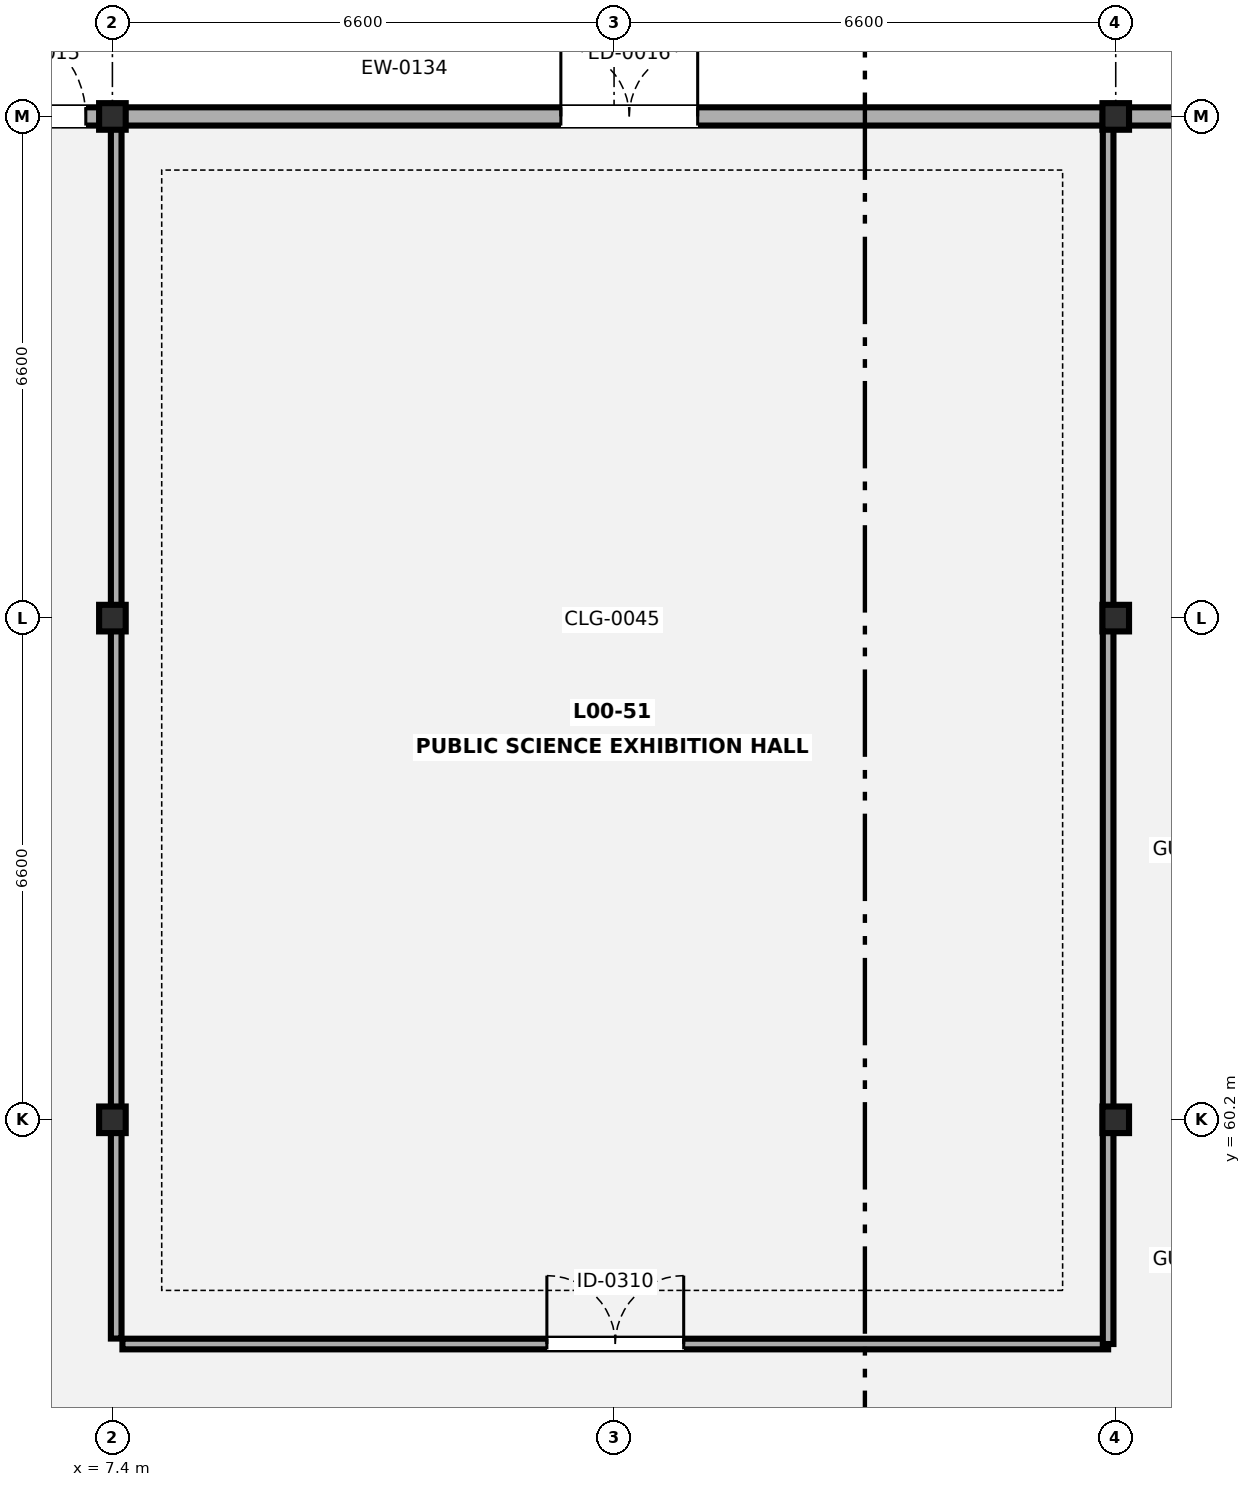
"""IFC4 building model, lengths in metres.
Left out: names, types, materials, properties, quantities, classifications, styles, units other than length and angle.
Written with IfcOpenShell. Run it as: python <this file> out.ifc"""

import sys

from ifc_helpers import new_model, si_unit, direction, frame, frame_2d, origin, origin_2d, place, context, subcontext, project, spatial, rectangle, i_section, extrude, element, fill, save


model = new_model("IFC4")
c1 = context("Model", 3, precision=1e-05, world=origin(), true_north=direction((0.0, 1.0)))
c2 = subcontext(c1, "Body", "Model", "MODEL_VIEW")
j1 = project(units=[si_unit("LENGTHUNIT", "METRE"), si_unit("PLANEANGLEUNIT", "RADIAN")], contexts=[c1])
p1 = place(None, origin())
s1 = spatial("IfcSite", under=j1, at=p1, CompositionType="ELEMENT")
p2 = place(p1, origin())
s2 = spatial("IfcBuilding", under=s1, at=p2, CompositionType="ELEMENT")
p3 = place(p2, origin())
s3 = spatial("IfcBuildingStorey", under=s2, at=p3, CompositionType="ELEMENT", Elevation=0.0)
for number, where, z_axis, x_axis in (
    (1, (7.4, 60.2, 0.0), (0.0, 0.0, 1.0), (1.0, 0.0, 0.0)),
    (2, (7.4, 66.8, 0.0), (0.0, 0.0, 1.0), (1.0, 0.0, 0.0)),
    (3, (7.4, 73.4, 0.0), (0.0, 0.0, 1.0), (1.0, 0.0, 0.0)),
    (4, (20.6, 60.2, 0.0), (0.0, 0.0, 1.0), (1.0, 0.0, 0.0)),
    (5, (20.6, 66.8, 0.0), (0.0, 0.0, 1.0), (1.0, 0.0, 0.0)),
    (6, (20.6, 73.4, 0.0), (0.0, 0.0, 1.0), (1.0, 0.0, 0.0)),
):
    element("IfcColumn", number, at=place(p3, frame(where, z_axis=z_axis, x_axis=x_axis)), inside=s3, PredefinedType="COLUMN", context=c2, shape_type="SweptSolid", body=[
        extrude(i_section(OverallWidth=0.35, OverallDepth=0.35, WebThickness=0.02, FlangeThickness=0.032, FilletRadius=0.016, at=origin_2d()), origin(), (0.0, 0.0, 1.0), 4.9),
    ])
p4 = place(p3, frame((1.973, 73.4, 0.0), z_axis=(0.0, 0.0, 1.0), x_axis=(1.0, 0.0, 0.0)))
e7 = element("IfcWall", 7, at=p4, inside=s3, PredefinedType="SOLIDWALL", context=c2, shape_type="SweptSolid", body=[
    extrude(rectangle(XDim=25.054, YDim=0.24, at=frame_2d((12.527, 0.0))), origin(), (0.0, 0.0, 1.0), 4.205),
])
p5 = place(p4, frame((3.827, 0.0, 0.0)))
e8 = element("IfcOpeningElement", 8, at=p5, cuts=e7, PredefinedType="OPENING", context=c2, shape_type="SweptSolid", body=[
    extrude(rectangle(XDim=1.25, YDim=2.15, at=frame_2d((0.625, 1.075))), frame((0.0, 0.13, 0.0), z_axis=(0.0, -1.0, 0.0), x_axis=(1.0, 0.0, 0.0)), (0.0, 0.0, 1.0), 0.26),
])
p6 = place(p4, frame((11.327, 0.0, 0.0)))
e9 = element("IfcOpeningElement", 9, at=p6, cuts=e7, PredefinedType="OPENING", context=c2, shape_type="SweptSolid", body=[
    extrude(rectangle(XDim=1.8, YDim=2.2, at=frame_2d((0.9, 1.1))), frame((0.0, 0.13, 0.0), z_axis=(0.0, -1.0, 0.0), x_axis=(1.0, 0.0, 0.0)), (0.0, 0.0, 1.0), 0.26),
])
p7 = place(p3, frame((7.532, 57.25, 0.0), z_axis=(0.0, 0.0, 1.0), x_axis=(1.0, 0.0, 0.0)))
e10 = element("IfcWall", 10, at=p7, inside=s3, PredefinedType="PARTITIONING", context=c2, shape_type="SweptSolid", body=[
    extrude(rectangle(XDim=12.968, YDim=0.14, at=frame_2d((6.484, 0.0))), origin(), (0.0, 0.0, 1.0), 4.7),
])
p8 = place(p7, frame((5.584, 0.0, 0.0)))
e11 = element("IfcOpeningElement", 11, at=p8, cuts=e10, PredefinedType="OPENING", context=c2, shape_type="SweptSolid", body=[
    extrude(rectangle(XDim=1.8, YDim=2.2, at=frame_2d((0.9, 1.1))), frame((0.0, 0.08, 0.0), z_axis=(0.0, -1.0, 0.0), x_axis=(1.0, 0.0, 0.0)), (0.0, 0.0, 1.0), 0.16),
])
p9 = place(p3, frame((7.45, 57.322, 0.0), z_axis=(0.0, 0.0, 1.0), x_axis=(0.0, 1.0, 0.0)))
e12 = element("IfcWall", 12, at=p9, inside=s3, PredefinedType="PARTITIONING", context=c2, shape_type="SweptSolid", body=[
    extrude(rectangle(XDim=16.078, YDim=0.14, at=frame_2d((8.039, 0.0))), origin(), (0.0, 0.0, 1.0), 4.145),
])
p10 = place(p3, frame((20.5, 57.25, 0.0), z_axis=(0.0, 0.0, 1.0), x_axis=(0.0, 1.0, 0.0)))
e13 = element("IfcWall", 13, at=p10, inside=s3, PredefinedType="PARTITIONING", context=c2, shape_type="SweptSolid", body=[
    extrude(rectangle(XDim=16.15, YDim=0.14, at=frame_2d((8.075, 0.0))), origin(), (0.0, 0.0, 1.0), 4.145),
])
p11 = place(p5, origin())
e14 = element("IfcDoor", 14, at=p11, inside=s3, OperationType="SINGLE_SWING_LEFT", PredefinedType="DOOR", context=c2, shape_type="SweptSolid", body=[
    extrude(rectangle(XDim=1.25, YDim=2.15, at=frame_2d((0.625, 1.075))), frame((0.0, 0.025, 0.0), z_axis=(0.0, -1.0, 0.0), x_axis=(1.0, 0.0, 0.0)), (0.0, 0.0, 1.0), 0.05),
])
fill(e8, e14)
p12 = place(p6, origin())
e15 = element("IfcDoor", 15, at=p12, inside=s3, OperationType="DOUBLE_DOOR_SINGLE_SWING", PredefinedType="DOOR", context=c2, shape_type="SweptSolid", body=[
    extrude(rectangle(XDim=1.8, YDim=2.2, at=frame_2d((0.9, 1.1))), frame((0.0, 0.025, 0.0), z_axis=(0.0, -1.0, 0.0), x_axis=(1.0, 0.0, 0.0)), (0.0, 0.0, 1.0), 0.05),
])
fill(e9, e15)
p13 = place(p8, origin())
e16 = element("IfcDoor", 16, at=p13, inside=s3, OperationType="DOUBLE_DOOR_SINGLE_SWING", PredefinedType="DOOR", context=c2, shape_type="SweptSolid", body=[
    extrude(rectangle(XDim=1.8, YDim=2.2, at=frame_2d((0.9, 1.1))), frame((0.0, 0.025, 0.0), z_axis=(0.0, -1.0, 0.0), x_axis=(1.0, 0.0, 0.0)), (0.0, 0.0, 1.0), 0.05),
])
fill(e11, e16)
save(model, sys.argv[1])
